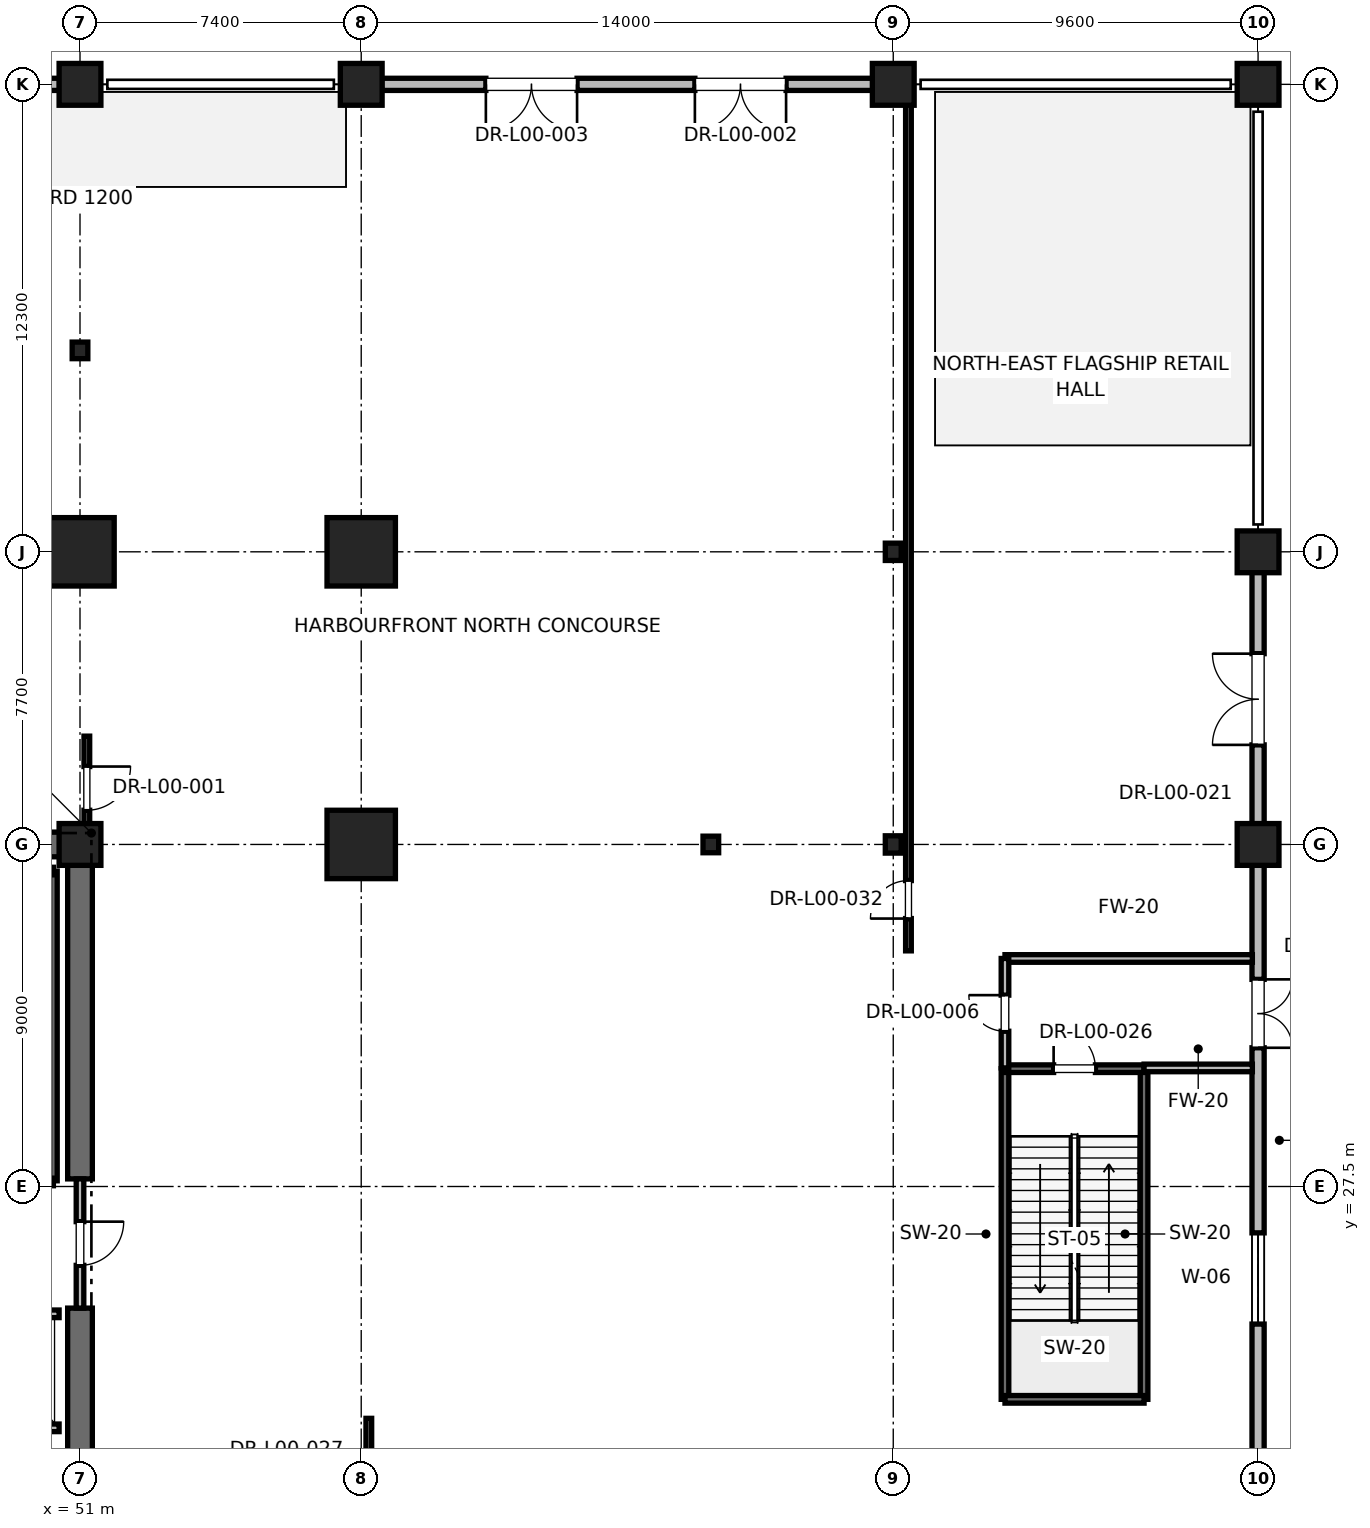
"""IFC4 building model, lengths in metres.
Left out: names, types, materials, properties, quantities, classifications, styles, units other than length and angle.
Written with IfcOpenShell. Run it as: python <this file> out.ifc"""

import sys

from ifc_helpers import new_model, si_unit, direction, frame, frame_2d, origin, origin_2d, place, context, subcontext, project, spatial, rectangle, i_section, extrude, element, fill, save


model = new_model("IFC4")
c1 = context("Model", 3, precision=1e-05, world=origin(), true_north=direction((0.0, 1.0)))
c2 = subcontext(c1, "Body", "Model", "MODEL_VIEW")
j1 = project(units=[si_unit("LENGTHUNIT", "METRE"), si_unit("PLANEANGLEUNIT", "RADIAN")], contexts=[c1])
p1 = place(None, origin())
s1 = spatial("IfcSite", under=j1, at=p1, CompositionType="ELEMENT")
p2 = place(p1, origin())
s2 = spatial("IfcBuilding", under=s1, at=p2, CompositionType="ELEMENT")
p3 = place(p2, origin())
s3 = spatial("IfcBuildingStorey", under=s2, at=p3, CompositionType="ELEMENT", Elevation=0.0)
for number, where, z_axis, x_axis in (
    (1, (51.0, 44.2, 0.0), (0.0, 0.0, 1.0), (1.0, 0.0, 0.0)),
    (2, (58.4, 36.5, 0.0), (0.0, 0.0, 1.0), (1.0, 0.0, 0.0)),
    (3, (58.4, 44.2, 0.0), (0.0, 0.0, 1.0), (1.0, 0.0, 0.0)),
):
    element("IfcColumn", number, at=place(p3, frame(where, z_axis=z_axis, x_axis=x_axis)), inside=s3, PredefinedType="COLUMN", context=c2, shape_type="SweptSolid", body=[
        extrude(rectangle(XDim=1.8, YDim=1.8, at=origin_2d()), origin(), (0.0, 0.0, 1.0), 6.0),
    ])
for number, where, z_axis, x_axis in (
    (4, (67.6, 36.5, 0.0), (0.0, 0.0, 1.0), (1.0, 0.0, 0.0)),
    (5, (51.0, 49.5, 0.0), (0.0, 0.0, 1.0), (1.0, 0.0, 0.0)),
):
    element("IfcColumn", number, at=place(p3, frame(where, z_axis=z_axis, x_axis=x_axis)), inside=s3, PredefinedType="COLUMN", context=c2, shape_type="SweptSolid", body=[
        extrude(i_section(OverallWidth=0.412, OverallDepth=0.437, WebThickness=0.036, FlangeThickness=0.058, FilletRadius=0.015, at=origin_2d()), origin(), (0.0, 0.0, 1.0), 6.0),
    ])
p4 = place(p3, frame((51.0, 36.5, 0.0), z_axis=(0.0, 0.0, 1.0), x_axis=(1.0, 0.0, 0.0)))
e6 = element("IfcColumn", 6, at=p4, inside=s3, PredefinedType="PILASTER", context=c2, shape_type="SweptSolid", body=[
    extrude(rectangle(XDim=1.1, YDim=1.1, at=origin_2d()), origin(), (0.0, 0.0, 1.0), 6.0),
])
for number, where, z_axis, x_axis in (
    (7, (82.0, 36.5, 0.0), (0.0, 0.0, 1.0), (1.0, 0.0, 0.0)),
    (8, (82.0, 44.2, 0.0), (0.0, 0.0, 1.0), (1.0, 0.0, 0.0)),
    (9, (82.0, 56.5, 0.0), (0.0, 0.0, 1.0), (1.0, 0.0, 0.0)),
    (10, (51.0, 56.5, 0.0), (0.0, 0.0, 1.0), (1.0, 0.0, 0.0)),
    (11, (58.4, 56.5, 0.0), (0.0, 0.0, 1.0), (1.0, 0.0, 0.0)),
    (12, (72.4, 56.5, 0.0), (0.0, 0.0, 1.0), (1.0, 0.0, 0.0)),
):
    element("IfcColumn", number, at=place(p3, frame(where, z_axis=z_axis, x_axis=x_axis)), inside=s3, PredefinedType="COLUMN", context=c2, shape_type="SweptSolid", body=[
        extrude(rectangle(XDim=1.1, YDim=1.1, at=origin_2d()), origin(), (0.0, 0.0, 1.0), 6.0),
    ])
for number, where, z_axis, x_axis in (
    (13, (72.4, 36.5, 0.0), (0.0, 0.0, 1.0), (1.0, 0.0, 0.0)),
    (14, (72.4, 44.2, 0.0), (0.0, 0.0, 1.0), (1.0, 0.0, 0.0)),
):
    element("IfcColumn", number, at=place(p3, frame(where, z_axis=z_axis, x_axis=x_axis)), inside=s3, PredefinedType="COLUMN", context=c2, shape_type="SweptSolid", body=[
        extrude(i_section(OverallWidth=0.418, OverallDepth=0.456, WebThickness=0.042, FlangeThickness=0.067, FilletRadius=0.015, at=origin_2d()), origin(), (0.0, 0.0, 1.0), 6.0),
    ])
for number, where, z_axis, x_axis in (
    (15, (45.2, 36.5, 0.0), (0.0, 0.0, 1.0), (1.0, 0.0, 0.0)),
    (16, (51.0, 18.5, 0.0), (0.0, 0.0, 1.0), (0.0, 1.0, 0.0)),
):
    element("IfcWall", number, at=place(p3, frame(where, z_axis=z_axis, x_axis=x_axis)), inside=s3, PredefinedType="SHEAR", context=c2, shape_type="SweptSolid", body=[
        extrude(rectangle(XDim=5.8, YDim=0.65, at=frame_2d((2.9, 0.0))), origin(), (0.0, 0.0, 1.0), 5.72),
    ])
p5 = place(p3, frame((51.0, 27.7, 0.0), z_axis=(0.0, 0.0, 1.0), x_axis=(0.0, 1.0, 0.0)))
e17 = element("IfcWall", 17, at=p5, inside=s3, PredefinedType="SHEAR", context=c2, shape_type="SweptSolid", body=[
    extrude(rectangle(XDim=8.8, YDim=0.65, at=frame_2d((4.4, 0.0))), origin(), (0.0, 0.0, 1.0), 5.72),
])
p6 = place(p3, frame((50.46, 56.5, 0.0), z_axis=(0.0, 0.0, 1.0), x_axis=(-1.0, 0.0, 0.0)))
e18 = element("IfcWall", 18, at=p6, inside=s3, PredefinedType="SOLIDWALL", context=c2, shape_type="SweptSolid", body=[
    extrude(rectangle(XDim=20.92, YDim=0.32, at=frame_2d((10.46, 0.0))), origin(), (0.0, 0.0, 1.0), 4.33),
])
p7 = place(p6, frame((7.18, 0.0, 0.0)))
e19 = element("IfcOpeningElement", 19, at=p7, cuts=e18, PredefinedType="OPENING", context=c2, shape_type="SweptSolid", body=[
    extrude(rectangle(XDim=6.4, YDim=4.1, at=frame_2d((3.2, 2.05))), frame((0.0, 0.16, 0.0), z_axis=(0.0, -1.0, 0.0), x_axis=(1.0, 0.0, 0.0)), (0.0, 0.0, 1.0), 0.32),
])
p8 = place(p3, frame((71.86, 56.5, 0.0), z_axis=(0.0, 0.0, 1.0), x_axis=(-1.0, 0.0, 0.0)))
e20 = element("IfcWall", 20, at=p8, inside=s3, PredefinedType="SOLIDWALL", context=c2, shape_type="SweptSolid", body=[
    extrude(rectangle(XDim=12.92, YDim=0.32, at=frame_2d((6.46, 0.0))), origin(), (0.0, 0.0, 1.0), 4.759),
])
p9 = place(p8, frame((2.28, 0.0, 0.0)))
e21 = element("IfcOpeningElement", 21, at=p9, cuts=e20, PredefinedType="OPENING", context=c2, shape_type="SweptSolid", body=[
    extrude(rectangle(XDim=2.4, YDim=2.8, at=frame_2d((1.2, 1.4))), frame((0.0, 0.16, 0.0), z_axis=(0.0, -1.0, 0.0), x_axis=(1.0, 0.0, 0.0)), (0.0, 0.0, 1.0), 0.32),
])
p10 = place(p8, frame((7.78, 0.0, 0.0)))
e22 = element("IfcOpeningElement", 22, at=p10, cuts=e20, PredefinedType="OPENING", context=c2, shape_type="SweptSolid", body=[
    extrude(rectangle(XDim=2.4, YDim=2.8, at=frame_2d((1.2, 1.4))), frame((0.0, 0.16, 0.0), z_axis=(0.0, -1.0, 0.0), x_axis=(1.0, 0.0, 0.0)), (0.0, 0.0, 1.0), 0.32),
])
p11 = place(p3, frame((82.0, 35.96, 0.0), z_axis=(0.0, 0.0, 1.0), x_axis=(0.0, -1.0, 0.0)))
e23 = element("IfcWall", 23, at=p11, inside=s3, PredefinedType="SOLIDWALL", context=c2, shape_type="SweptSolid", body=[
    extrude(rectangle(XDim=16.92, YDim=0.32, at=frame_2d((8.46, 0.0))), origin(), (0.0, 0.0, 1.0), 4.759),
])
p12 = place(p11, frame((3.01, 0.0, 0.0)))
e24 = element("IfcOpeningElement", 24, at=p12, cuts=e23, PredefinedType="OPENING", context=c2, shape_type="SweptSolid", body=[
    extrude(rectangle(XDim=1.8, YDim=2.4, at=frame_2d((0.9, 1.2))), frame((0.0, 0.16, 0.0), z_axis=(0.0, -1.0, 0.0), x_axis=(1.0, 0.0, 0.0)), (0.0, 0.0, 1.0), 0.32),
])
p13 = place(p11, frame((9.68, 0.0, 0.9)))
e25 = element("IfcOpeningElement", 25, at=p13, cuts=e23, PredefinedType="OPENING", context=c2, shape_type="SweptSolid", body=[
    extrude(rectangle(XDim=2.4, YDim=2.4, at=frame_2d((1.2, 1.2))), frame((0.0, 0.16, 0.0), z_axis=(0.0, -1.0, 0.0), x_axis=(1.0, 0.0, 0.0)), (0.0, 0.0, 1.0), 0.32),
])
p14 = place(p3, frame((82.0, 37.04, 0.0), z_axis=(0.0, 0.0, 1.0), x_axis=(0.0, 1.0, 0.0)))
e26 = element("IfcWall", 26, at=p14, inside=s3, PredefinedType="SOLIDWALL", context=c2, shape_type="SweptSolid", body=[
    extrude(rectangle(XDim=6.62, YDim=0.32, at=frame_2d((3.31, 0.0))), origin(), (0.0, 0.0, 1.0), 4.759),
])
p15 = place(p14, frame((2.08, 0.0, 0.0)))
e27 = element("IfcOpeningElement", 27, at=p15, cuts=e26, PredefinedType="OPENING", context=c2, shape_type="SweptSolid", body=[
    extrude(rectangle(XDim=2.4, YDim=2.8, at=frame_2d((1.2, 1.4))), frame((0.0, 0.16, 0.0), z_axis=(0.0, -1.0, 0.0), x_axis=(1.0, 0.0, 0.0)), (0.0, 0.0, 1.0), 0.32),
])
p16 = place(p3, frame((50.3, 27.65, 0.0), z_axis=(0.0, 0.0, 1.0), x_axis=(0.0, 1.0, 0.0)))
e28 = element("IfcWall", 28, at=p16, inside=s3, PredefinedType="SOLIDWALL", context=c2, shape_type="SweptSolid", body=[
    extrude(rectangle(XDim=8.15, YDim=0.2, at=frame_2d((4.075, 0.0))), origin(), (0.0, 0.0, 1.0), 5.72),
])
p17 = place(p3, frame((47.18, 35.8, 0.0), z_axis=(0.0, 0.0, 1.0), x_axis=(1.0, 0.0, 0.0)))
e29 = element("IfcWall", 29, at=p17, inside=s3, PredefinedType="SOLIDWALL", context=c2, shape_type="SweptSolid", body=[
    extrude(rectangle(XDim=3.12, YDim=0.2, at=frame_2d((1.56, 0.0))), origin(), (0.0, 0.0, 1.0), 5.72),
])
p18 = place(p3, frame((47.18, 27.62, 0.0), z_axis=(0.0, 0.0, 1.0), x_axis=(1.0, 0.0, 0.0)))
e30 = element("IfcWall", 30, at=p18, inside=s3, PredefinedType="SOLIDWALL", context=c2, shape_type="SweptSolid", body=[
    extrude(rectangle(XDim=3.12, YDim=0.2, at=frame_2d((1.56, 0.0))), origin(), (0.0, 0.0, 1.0), 5.72),
])
p19 = place(p18, frame((1.01, 0.0, 0.0)))
e31 = element("IfcOpeningElement", 31, at=p19, cuts=e30, PredefinedType="OPENING", context=c2, shape_type="SweptSolid", body=[
    extrude(rectangle(XDim=1.1, YDim=2.15, at=frame_2d((0.55, 1.075))), frame((0.0, 0.1, 0.0), z_axis=(0.0, -1.0, 0.0), x_axis=(1.0, 0.0, 0.0)), (0.0, 0.0, 1.0), 0.2),
])
for number, where, z_axis, x_axis in (
    (32, (75.34, 21.9, 0.0), (0.0, 0.0, 1.0), (0.0, 1.0, 0.0)),
    (33, (79.0, 21.9, 0.0), (0.0, 0.0, 1.0), (0.0, 1.0, 0.0)),
):
    element("IfcWall", number, at=place(p3, frame(where, z_axis=z_axis, x_axis=x_axis)), inside=s3, PredefinedType="SOLIDWALL", context=c2, shape_type="SweptSolid", body=[
        extrude(rectangle(XDim=8.7, YDim=0.2, at=frame_2d((4.35, 0.0))), origin(), (0.0, 0.0, 1.0), 5.72),
    ])
p20 = place(p3, frame((75.34, 30.6, 0.0), z_axis=(0.0, 0.0, 1.0), x_axis=(1.0, 0.0, 0.0)))
e34 = element("IfcWall", 34, at=p20, inside=s3, PredefinedType="SOLIDWALL", context=c2, shape_type="SweptSolid", body=[
    extrude(rectangle(XDim=3.66, YDim=0.2, at=frame_2d((1.83, 0.0))), origin(), (0.0, 0.0, 1.0), 5.72),
])
p21 = place(p20, frame((1.28, 0.0, 0.0)))
e35 = element("IfcOpeningElement", 35, at=p21, cuts=e34, PredefinedType="OPENING", context=c2, shape_type="SweptSolid", body=[
    extrude(rectangle(XDim=1.1, YDim=2.15, at=frame_2d((0.55, 1.075))), frame((0.0, 0.1, 0.0), z_axis=(0.0, -1.0, 0.0), x_axis=(1.0, 0.0, 0.0)), (0.0, 0.0, 1.0), 0.2),
])
p22 = place(p3, frame((75.34, 21.9, 0.0), z_axis=(0.0, 0.0, 1.0), x_axis=(1.0, 0.0, 0.0)))
e36 = element("IfcWall", 36, at=p22, inside=s3, PredefinedType="SOLIDWALL", context=c2, shape_type="SweptSolid", body=[
    extrude(rectangle(XDim=3.66, YDim=0.2, at=frame_2d((1.83, 0.0))), origin(), (0.0, 0.0, 1.0), 5.72),
])
p23 = place(p3, frame((51.0, 27.7, 0.0), z_axis=(0.0, 0.0, 1.0), x_axis=(0.0, -1.0, 0.0)))
e37 = element("IfcWall", 37, at=p23, inside=s3, PredefinedType="PARTITIONING", context=c2, shape_type="SweptSolid", body=[
    extrude(rectangle(XDim=3.4, YDim=0.2, at=frame_2d((1.7, 0.0))), origin(), (0.0, 0.0, 1.0), 4.5),
])
p24 = place(p23, frame((1.125, 0.0, 0.0)))
e38 = element("IfcOpeningElement", 38, at=p24, cuts=e37, PredefinedType="OPENING", context=c2, shape_type="SweptSolid", body=[
    extrude(rectangle(XDim=1.15, YDim=2.2, at=frame_2d((0.575, 1.1))), frame((0.0, 0.1, 0.0), z_axis=(0.0, -1.0, 0.0), x_axis=(1.0, 0.0, 0.0)), (0.0, 0.0, 1.0), 0.2),
])
p25 = place(p3, frame((47.85, 21.15, 0.0), z_axis=(0.0, 0.0, 1.0), x_axis=(1.0, 0.0, 0.0)))
e39 = element("IfcWall", 39, at=p25, inside=s3, PredefinedType="SOLIDWALL", context=c2, shape_type="SweptSolid", body=[
    extrude(rectangle(XDim=2.6, YDim=0.2, at=frame_2d((1.3, 0.0))), origin(), (0.0, 0.0, 1.0), 5.72),
])
p26 = place(p3, frame((50.45, 24.15, 0.0), z_axis=(0.0, 0.0, 1.0), x_axis=(-1.0, 0.0, 0.0)))
e40 = element("IfcWall", 40, at=p26, inside=s3, PredefinedType="SOLIDWALL", context=c2, shape_type="SweptSolid", body=[
    extrude(rectangle(XDim=2.6, YDim=0.2, at=frame_2d((1.3, 0.0))), origin(), (0.0, 0.0, 1.0), 4.5),
])
p27 = place(p26, frame((0.75, 0.0, 0.0)))
e41 = element("IfcOpeningElement", 41, at=p27, cuts=e40, PredefinedType="OPENING", context=c2, shape_type="SweptSolid", body=[
    extrude(rectangle(XDim=1.1, YDim=2.2, at=frame_2d((0.55, 1.1))), frame((0.0, 0.1, 0.0), z_axis=(0.0, -1.0, 0.0), x_axis=(1.0, 0.0, 0.0)), (0.0, 0.0, 1.0), 0.2),
])
p28 = place(p3, frame((75.34, 33.5, 0.0), z_axis=(0.0, 0.0, 1.0), x_axis=(1.0, 0.0, 0.0)))
e42 = element("IfcWall", 42, at=p28, inside=s3, PredefinedType="PARTITIONING", context=c2, shape_type="SweptSolid", body=[
    extrude(rectangle(XDim=6.51, YDim=0.2, at=frame_2d((3.255, 0.0))), origin(), (0.0, 0.0, 1.0), 2.85),
])
p29 = place(p3, frame((79.0, 30.62, 0.0), z_axis=(0.0, 0.0, 1.0), x_axis=(1.0, 0.0, 0.0)))
e43 = element("IfcWall", 43, at=p29, inside=s3, PredefinedType="PARTITIONING", context=c2, shape_type="SweptSolid", body=[
    extrude(rectangle(XDim=2.85, YDim=0.2, at=frame_2d((1.425, 0.0))), origin(), (0.0, 0.0, 1.0), 2.85),
])
p30 = place(p3, frame((75.34, 30.62, 0.0), z_axis=(0.0, 0.0, 1.0), x_axis=(0.0, 1.0, 0.0)))
e44 = element("IfcWall", 44, at=p30, inside=s3, PredefinedType="PARTITIONING", context=c2, shape_type="SweptSolid", body=[
    extrude(rectangle(XDim=2.88, YDim=0.2, at=frame_2d((1.44, 0.0))), origin(), (0.0, 0.0, 1.0), 2.85),
])
p31 = place(p30, frame((0.965, 0.0, 0.0)))
e45 = element("IfcOpeningElement", 45, at=p31, cuts=e44, PredefinedType="OPENING", context=c2, shape_type="SweptSolid", body=[
    extrude(rectangle(XDim=0.95, YDim=2.15, at=frame_2d((0.475, 1.075))), frame((0.0, 0.1, 0.0), z_axis=(0.0, -1.0, 0.0), x_axis=(1.0, 0.0, 0.0)), (0.0, 0.0, 1.0), 0.2),
])
p32 = place(p3, frame((51.18, 39.35, 0.0), z_axis=(0.0, 0.0, 1.0), x_axis=(0.0, -1.0, 0.0)))
e46 = element("IfcWall", 46, at=p32, inside=s3, PredefinedType="PARTITIONING", context=c2, shape_type="SweptSolid", body=[
    extrude(rectangle(XDim=2.75, YDim=0.15, at=frame_2d((1.375, 0.0))), origin(), (0.0, 0.0, 1.0), 2.85),
])
p33 = place(p32, frame((0.8, 0.0, 0.0)))
e47 = element("IfcOpeningElement", 47, at=p33, cuts=e46, PredefinedType="OPENING", context=c2, shape_type="SweptSolid", body=[
    extrude(rectangle(XDim=1.15, YDim=2.2, at=frame_2d((0.575, 1.1))), frame((0.0, 0.075, 0.0), z_axis=(0.0, -1.0, 0.0), x_axis=(1.0, 0.0, 0.0)), (0.0, 0.0, 1.0), 0.15),
])
p34 = place(p3, frame((58.6, -1.35, 0.0), z_axis=(0.0, 0.0, 1.0), x_axis=(0.0, 1.0, 0.0)))
e48 = element("IfcWall", 48, at=p34, inside=s3, PredefinedType="PARTITIONING", context=c2, shape_type="SweptSolid", body=[
    extrude(rectangle(XDim=22.75, YDim=0.15, at=frame_2d((11.375, 0.0))), origin(), (0.0, 0.0, 1.0), 2.85),
])
p35 = place(p34, frame((20.85, 0.0, 0.0)))
e49 = element("IfcOpeningElement", 49, at=p35, cuts=e48, PredefinedType="OPENING", context=c2, shape_type="SweptSolid", body=[
    extrude(rectangle(XDim=1.0, YDim=2.15, at=frame_2d((0.5, 1.075))), frame((0.0, 0.075, 0.0), z_axis=(0.0, -1.0, 0.0), x_axis=(1.0, 0.0, 0.0)), (0.0, 0.0, 1.0), 0.15),
])
p36 = place(p3, frame((72.8, 33.7, 0.0), z_axis=(0.0, 0.0, 1.0), x_axis=(0.0, 1.0, 0.0)))
e50 = element("IfcWall", 50, at=p36, inside=s3, PredefinedType="PARTITIONING", context=c2, shape_type="SweptSolid", body=[
    extrude(rectangle(XDim=22.65, YDim=0.15, at=frame_2d((11.325, 0.0))), origin(), (0.0, 0.0, 1.0), 2.85),
])
p37 = place(p36, frame((0.85, 0.0, 0.0)))
e51 = element("IfcOpeningElement", 51, at=p37, cuts=e50, PredefinedType="OPENING", context=c2, shape_type="SweptSolid", body=[
    extrude(rectangle(XDim=1.0, YDim=2.15, at=frame_2d((0.5, 1.075))), frame((0.0, 0.075, 0.0), z_axis=(0.0, -1.0, 0.0), x_axis=(1.0, 0.0, 0.0)), (0.0, 0.0, 1.0), 0.15),
])
p38 = place(p9, origin())
e52 = element("IfcDoor", 52, at=p38, inside=s3, OperationType="DOUBLE_DOOR_SINGLE_SWING", PredefinedType="DOOR", context=c2, shape_type="SweptSolid", body=[
    extrude(rectangle(XDim=2.4, YDim=2.8, at=frame_2d((1.2, 1.4))), frame((0.0, 0.025, 0.0), z_axis=(0.0, -1.0, 0.0), x_axis=(1.0, 0.0, 0.0)), (0.0, 0.0, 1.0), 0.05),
])
fill(e21, e52)
p39 = place(p10, origin())
e53 = element("IfcDoor", 53, at=p39, inside=s3, OperationType="DOUBLE_DOOR_SINGLE_SWING", PredefinedType="DOOR", context=c2, shape_type="SweptSolid", body=[
    extrude(rectangle(XDim=2.4, YDim=2.8, at=frame_2d((1.2, 1.4))), frame((0.0, 0.025, 0.0), z_axis=(0.0, -1.0, 0.0), x_axis=(1.0, 0.0, 0.0)), (0.0, 0.0, 1.0), 0.05),
])
fill(e22, e53)
p40 = place(p12, origin())
e54 = element("IfcDoor", 54, at=p40, inside=s3, OperationType="DOUBLE_DOOR_SINGLE_SWING", PredefinedType="DOOR", context=c2, shape_type="SweptSolid", body=[
    extrude(rectangle(XDim=1.8, YDim=2.4, at=frame_2d((0.9, 1.2))), frame((0.0, 0.025, 0.0), z_axis=(0.0, -1.0, 0.0), x_axis=(1.0, 0.0, 0.0)), (0.0, 0.0, 1.0), 0.05),
])
fill(e24, e54)
p41 = place(p13, origin())
e55 = element("IfcWindow", 55, at=p41, inside=s3, PartitioningType="SINGLE_PANEL", PredefinedType="WINDOW", context=c2, shape_type="SweptSolid", body=[
    extrude(rectangle(XDim=2.4, YDim=2.4, at=frame_2d((1.2, 1.2))), frame((0.0, 0.03, 0.0), z_axis=(0.0, -1.0, 0.0), x_axis=(1.0, 0.0, 0.0)), (0.0, 0.0, 1.0), 0.06),
])
fill(e25, e55)
p42 = place(p15, origin())
e56 = element("IfcDoor", 56, at=p42, inside=s3, OperationType="DOUBLE_DOOR_SINGLE_SWING", PredefinedType="DOOR", context=c2, shape_type="SweptSolid", body=[
    extrude(rectangle(XDim=2.4, YDim=2.8, at=frame_2d((1.2, 1.4))), frame((0.0, 0.025, 0.0), z_axis=(0.0, -1.0, 0.0), x_axis=(1.0, 0.0, 0.0)), (0.0, 0.0, 1.0), 0.05),
])
fill(e27, e56)
p43 = place(p21, origin())
e57 = element("IfcDoor", 57, at=p43, inside=s3, OperationType="SINGLE_SWING_LEFT", PredefinedType="DOOR", context=c2, shape_type="SweptSolid", body=[
    extrude(rectangle(XDim=1.1, YDim=2.15, at=frame_2d((0.55, 1.075))), frame((0.0, 0.025, 0.0), z_axis=(0.0, -1.0, 0.0), x_axis=(1.0, 0.0, 0.0)), (0.0, 0.0, 1.0), 0.05),
])
fill(e35, e57)
p44 = place(p24, origin())
e58 = element("IfcDoor", 58, at=p44, inside=s3, OperationType="SINGLE_SWING_LEFT", PredefinedType="DOOR", context=c2, shape_type="SweptSolid", body=[
    extrude(rectangle(XDim=1.15, YDim=2.2, at=frame_2d((0.575, 1.1))), frame((0.0, 0.025, 0.0), z_axis=(0.0, -1.0, 0.0), x_axis=(1.0, 0.0, 0.0)), (0.0, 0.0, 1.0), 0.05),
])
fill(e38, e58)
p45 = place(p31, origin())
e59 = element("IfcDoor", 59, at=p45, inside=s3, OperationType="SINGLE_SWING_RIGHT", PredefinedType="DOOR", context=c2, shape_type="SweptSolid", body=[
    extrude(rectangle(XDim=0.95, YDim=2.15, at=frame_2d((0.475, 1.075))), frame((0.0, 0.025, 0.0), z_axis=(0.0, -1.0, 0.0), x_axis=(1.0, 0.0, 0.0)), (0.0, 0.0, 1.0), 0.05),
])
fill(e45, e59)
p46 = place(p33, origin())
e60 = element("IfcDoor", 60, at=p46, inside=s3, OperationType="SINGLE_SWING_LEFT", PredefinedType="DOOR", context=c2, shape_type="SweptSolid", body=[
    extrude(rectangle(XDim=1.15, YDim=2.2, at=frame_2d((0.575, 1.1))), frame((0.0, 0.025, 0.0), z_axis=(0.0, -1.0, 0.0), x_axis=(1.0, 0.0, 0.0)), (0.0, 0.0, 1.0), 0.05),
])
fill(e47, e60)
p47 = place(p37, origin())
e61 = element("IfcDoor", 61, at=p47, inside=s3, OperationType="SINGLE_SWING_LEFT", PredefinedType="DOOR", context=c2, shape_type="SweptSolid", body=[
    extrude(rectangle(XDim=1.0, YDim=2.15, at=frame_2d((0.5, 1.075))), frame((0.0, 0.025, 0.0), z_axis=(0.0, -1.0, 0.0), x_axis=(1.0, 0.0, 0.0)), (0.0, 0.0, 1.0), 0.05),
])
fill(e51, e61)
save(model, sys.argv[1])
